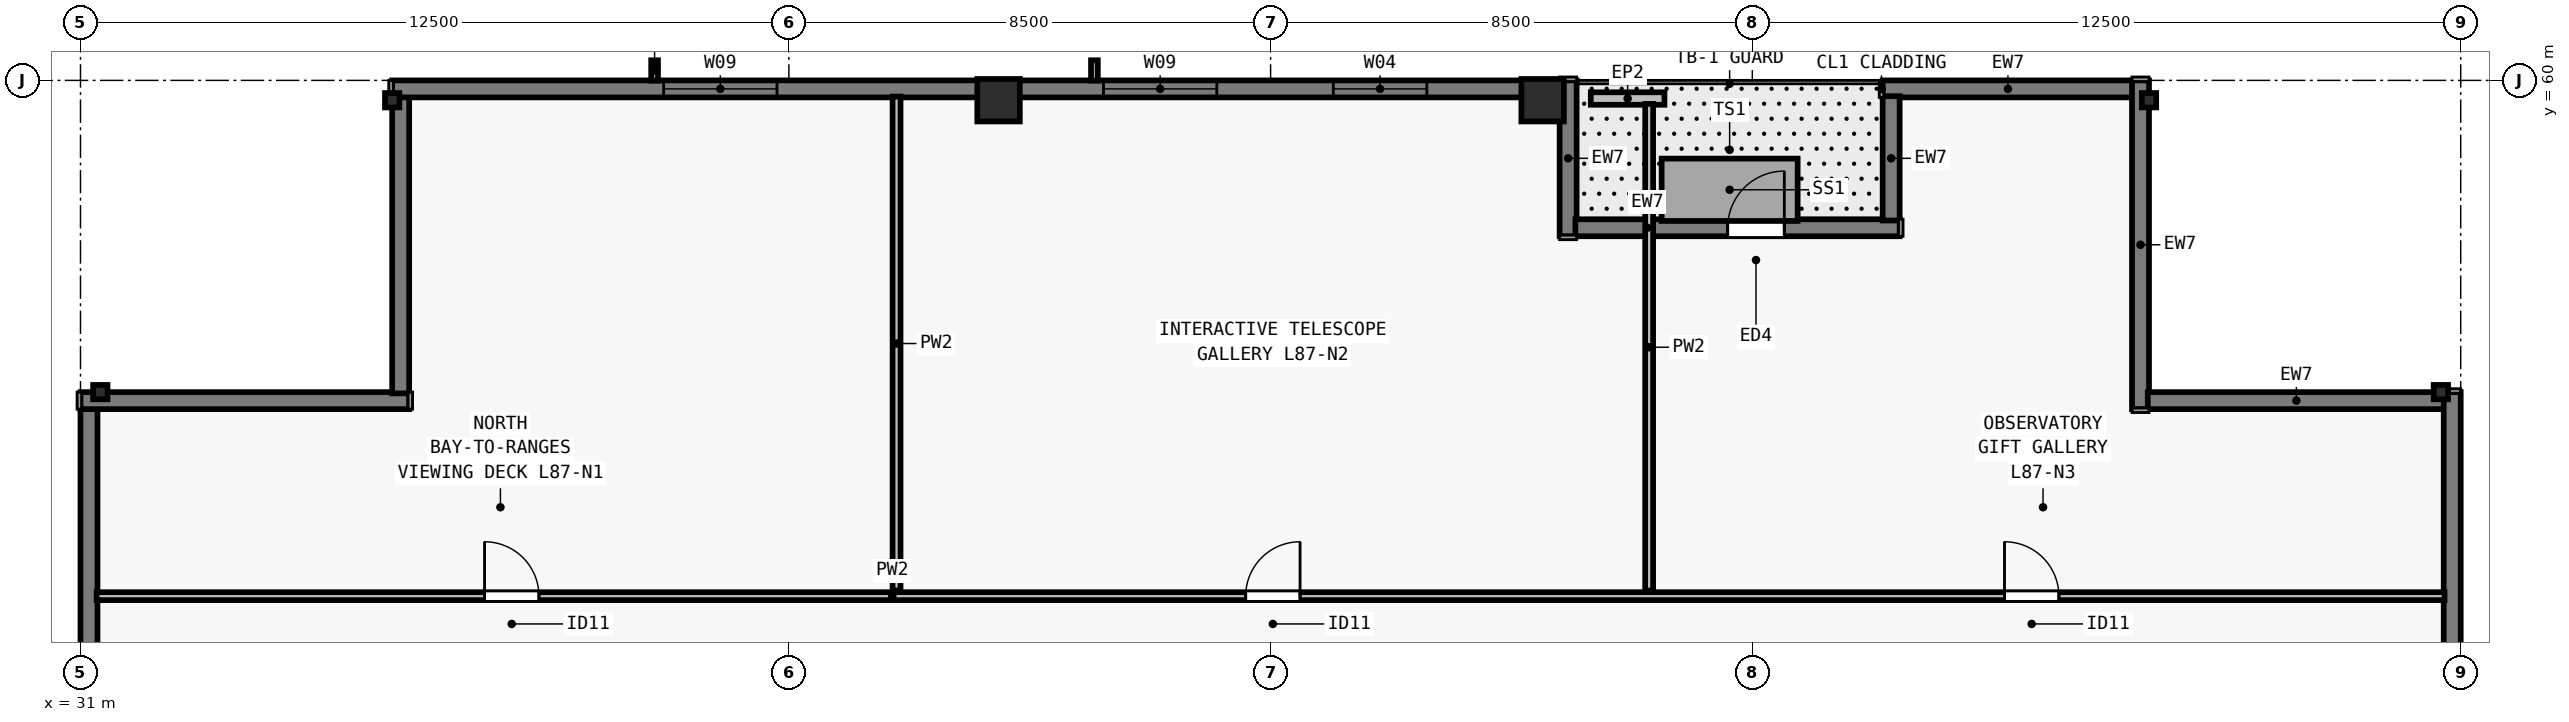
"""IFC4 building model, lengths in metres.
Left out: names, types, materials, properties, quantities, classifications, styles, units other than length and angle.
Written with IfcOpenShell. Run it as: python <this file> out.ifc"""

import sys

from ifc_helpers import new_model, si_unit, direction, frame, frame_2d, origin, origin_2d, place, context, subcontext, project, spatial, rectangle, i_section, extrude, element, fill, save


model = new_model("IFC4")
c1 = context("Model", 3, precision=1e-05, world=origin(), true_north=direction((0.0, 1.0)))
c2 = subcontext(c1, "Body", "Model", "MODEL_VIEW")
j1 = project(units=[si_unit("LENGTHUNIT", "METRE"), si_unit("PLANEANGLEUNIT", "RADIAN")], contexts=[c1])
p1 = place(None, origin())
s1 = spatial("IfcSite", under=j1, at=p1, CompositionType="ELEMENT")
p2 = place(p1, origin())
s2 = spatial("IfcBuilding", under=s1, at=p2, CompositionType="ELEMENT")
p3 = place(p2, frame((0.0, 0.0, 315.5)))
s3 = spatial("IfcBuildingStorey", under=s2, at=p3, CompositionType="ELEMENT", Elevation=315.5)
for number, where, z_axis, x_axis in (
    (1, (72.65, 54.5, 0.0), (0.0, 0.0, 1.0), (0.0, 1.0, 0.0)),
    (2, (67.5, 59.65, 0.0), (0.0, 0.0, 1.0), (1.0, 0.0, 0.0)),
):
    element("IfcColumn", number, at=place(p3, frame(where, z_axis=z_axis, x_axis=x_axis)), inside=s3, PredefinedType="COLUMN", context=c2, shape_type="SweptSolid", body=[
        extrude(i_section(OverallWidth=0.254, OverallDepth=0.254, WebThickness=0.009, FlangeThickness=0.014, FilletRadius=0.013, at=origin_2d()), origin(), (0.0, 0.0, 1.0), 4.5),
    ])
for number, where, z_axis, x_axis in (
    (3, (56.8, 59.65, 0.0), (0.0, 0.0, 1.0), (1.0, 0.0, 0.0)),
    (4, (47.2, 59.65, 0.0), (0.0, 0.0, 1.0), (1.0, 0.0, 0.0)),
):
    element("IfcColumn", number, at=place(p3, frame(where, z_axis=z_axis, x_axis=x_axis)), inside=s3, PredefinedType="COLUMN", context=c2, shape_type="SweptSolid", body=[
        extrude(rectangle(XDim=0.75, YDim=0.75, at=origin_2d()), origin(), (0.0, 0.0, 1.0), 4.5),
    ])
for number, where, z_axis, x_axis in (
    (5, (36.5, 59.65, 0.0), (0.0, 0.0, 1.0), (1.0, 0.0, 0.0)),
    (6, (31.35, 54.5, 0.0), (0.0, 0.0, 1.0), (0.0, 1.0, 0.0)),
):
    element("IfcColumn", number, at=place(p3, frame(where, z_axis=z_axis, x_axis=x_axis)), inside=s3, PredefinedType="COLUMN", context=c2, shape_type="SweptSolid", body=[
        extrude(i_section(OverallWidth=0.254, OverallDepth=0.254, WebThickness=0.009, FlangeThickness=0.014, FilletRadius=0.013, at=origin_2d()), origin(), (0.0, 0.0, 1.0), 4.5),
    ])
p4 = place(p3, frame((62.8, 59.85, 0.0), z_axis=(0.0, 0.0, 1.0), x_axis=(1.0, 0.0, 0.0)))
e7 = element("IfcWall", 7, at=p4, inside=s3, PredefinedType="SOLIDWALL", context=c2, shape_type="SweptSolid", body=[
    extrude(rectangle(XDim=4.422, YDim=0.3, at=frame_2d((2.211, 0.0))), origin(), (0.0, 0.0, 1.0), 4.29),
])
p5 = place(p3, frame((67.35, 60.0, 0.0), z_axis=(0.0, 0.0, 1.0), x_axis=(0.0, -1.0, 0.0)))
e8 = element("IfcWall", 8, at=p5, inside=s3, PredefinedType="SOLIDWALL", context=c2, shape_type="SweptSolid", body=[
    extrude(rectangle(XDim=5.8, YDim=0.3, at=frame_2d((2.9, 0.0))), origin(), (0.0, 0.0, 1.0), 4.29),
])
p6 = place(p3, frame((67.478, 54.35, 0.0), z_axis=(0.0, 0.0, 1.0), x_axis=(1.0, 0.0, 0.0)))
e9 = element("IfcWall", 9, at=p6, inside=s3, PredefinedType="SOLIDWALL", context=c2, shape_type="SweptSolid", body=[
    extrude(rectangle(XDim=5.244, YDim=0.3, at=frame_2d((2.622, 0.0))), origin(), (0.0, 0.0, 1.0), 4.29),
])
p7 = place(p3, frame((72.85, 54.5, 0.0), z_axis=(0.0, 0.0, 1.0), x_axis=(0.0, -1.0, 0.0)))
e10 = element("IfcWall", 10, at=p7, inside=s3, PredefinedType="SOLIDWALL", context=c2, shape_type="SweptSolid", body=[
    extrude(rectangle(XDim=11.8, YDim=0.3, at=frame_2d((5.9, 0.0))), origin(), (0.0, 0.0, 1.0), 4.29),
])
p8 = place(p3, frame((31.15, 42.7, 0.0), z_axis=(0.0, 0.0, 1.0), x_axis=(0.0, 1.0, 0.0)))
e11 = element("IfcWall", 11, at=p8, inside=s3, PredefinedType="SOLIDWALL", context=c2, shape_type="SweptSolid", body=[
    extrude(rectangle(XDim=11.522, YDim=0.3, at=frame_2d((5.761, 0.0))), origin(), (0.0, 0.0, 1.0), 4.29),
])
p9 = place(p3, frame((31.0, 54.35, 0.0), z_axis=(0.0, 0.0, 1.0), x_axis=(1.0, 0.0, 0.0)))
e12 = element("IfcWall", 12, at=p9, inside=s3, PredefinedType="SOLIDWALL", context=c2, shape_type="SweptSolid", body=[
    extrude(rectangle(XDim=5.8, YDim=0.3, at=frame_2d((2.9, 0.0))), origin(), (0.0, 0.0, 1.0), 4.29),
])
p10 = place(p3, frame((36.65, 54.478, 0.0), z_axis=(0.0, 0.0, 1.0), x_axis=(0.0, 1.0, 0.0)))
e13 = element("IfcWall", 13, at=p10, inside=s3, PredefinedType="SOLIDWALL", context=c2, shape_type="SweptSolid", body=[
    extrude(rectangle(XDim=5.244, YDim=0.3, at=frame_2d((2.622, 0.0))), origin(), (0.0, 0.0, 1.0), 4.29),
])
p11 = place(p3, frame((36.5, 59.85, 0.0), z_axis=(0.0, 0.0, 1.0), x_axis=(1.0, 0.0, 0.0)))
e14 = element("IfcWall", 14, at=p11, inside=s3, PredefinedType="SOLIDWALL", context=c2, shape_type="SweptSolid", body=[
    extrude(rectangle(XDim=20.622, YDim=0.3, at=frame_2d((10.311, 0.0))), origin(), (0.0, 0.0, 1.0), 4.29),
])
p12 = place(p11, frame((4.79, 0.0, 0.8)))
e15 = element("IfcOpeningElement", 15, at=p12, cuts=e14, PredefinedType="OPENING", context=c2, shape_type="SweptSolid", body=[
    extrude(rectangle(XDim=2.0, YDim=1.85, at=frame_2d((1.0, 0.925))), frame((0.0, 0.16, 0.0), z_axis=(0.0, -1.0, 0.0), x_axis=(1.0, 0.0, 0.0)), (0.0, 0.0, 1.0), 0.32),
])
p13 = place(p11, frame((12.551, 0.0, 0.8)))
e16 = element("IfcOpeningElement", 16, at=p13, cuts=e14, PredefinedType="OPENING", context=c2, shape_type="SweptSolid", body=[
    extrude(rectangle(XDim=2.0, YDim=1.85, at=frame_2d((1.0, 0.925))), frame((0.0, 0.16, 0.0), z_axis=(0.0, -1.0, 0.0), x_axis=(1.0, 0.0, 0.0)), (0.0, 0.0, 1.0), 0.32),
])
p14 = place(p11, frame((16.607, 0.0, 0.8)))
e17 = element("IfcOpeningElement", 17, at=p14, cuts=e14, PredefinedType="OPENING", context=c2, shape_type="SweptSolid", body=[
    extrude(rectangle(XDim=1.65, YDim=1.85, at=frame_2d((0.825, 0.925))), frame((0.0, 0.16, 0.0), z_axis=(0.0, -1.0, 0.0), x_axis=(1.0, 0.0, 0.0)), (0.0, 0.0, 1.0), 0.32),
])
p15 = place(p3, frame((57.25, 60.0, 0.0), z_axis=(0.0, 0.0, 1.0), x_axis=(0.0, -1.0, 0.0)))
e18 = element("IfcWall", 18, at=p15, inside=s3, PredefinedType="SOLIDWALL", context=c2, shape_type="SweptSolid", body=[
    extrude(rectangle(XDim=2.75, YDim=0.3, at=frame_2d((1.375, 0.0))), origin(), (0.0, 0.0, 1.0), 4.29),
])
p16 = place(p3, frame((57.378, 57.4, 0.0), z_axis=(0.0, 0.0, 1.0), x_axis=(1.0, 0.0, 0.0)))
e19 = element("IfcWall", 19, at=p16, inside=s3, PredefinedType="SOLIDWALL", context=c2, shape_type="SweptSolid", body=[
    extrude(rectangle(XDim=5.722, YDim=0.3, at=frame_2d((2.861, 0.0))), origin(), (0.0, 0.0, 1.0), 4.29),
])
p17 = place(p16, frame((2.687, 0.0, 0.0)))
e20 = element("IfcOpeningElement", 20, at=p17, cuts=e19, PredefinedType="OPENING", context=c2, shape_type="SweptSolid", body=[
    extrude(rectangle(XDim=1.0, YDim=2.15, at=frame_2d((0.5, 1.075))), frame((0.0, 0.16, 0.0), z_axis=(0.0, -1.0, 0.0), x_axis=(1.0, 0.0, 0.0)), (0.0, 0.0, 1.0), 0.32),
])
p18 = place(p3, frame((62.95, 57.528, 0.0), z_axis=(0.0, 0.0, 1.0), x_axis=(0.0, 1.0, 0.0)))
e21 = element("IfcWall", 21, at=p18, inside=s3, PredefinedType="SOLIDWALL", context=c2, shape_type="SweptSolid", body=[
    extrude(rectangle(XDim=2.194, YDim=0.3, at=frame_2d((1.097, 0.0))), origin(), (0.0, 0.0, 1.0), 4.29),
])
p19 = place(p3, frame((57.65, 59.68, 0.0), z_axis=(0.0, 0.0, 1.0), x_axis=(1.0, 0.0, 0.0)))
e22 = element("IfcWall", 22, at=p19, inside=s3, PredefinedType="PARAPET", context=c2, shape_type="SweptSolid", body=[
    extrude(rectangle(XDim=1.3, YDim=0.22, at=frame_2d((0.65, 0.0))), origin(), (0.0, 0.0, 1.0), 0.55),
])
p20 = place(p3, frame((31.285, 50.9, 0.0), z_axis=(0.0, 0.0, 1.0), x_axis=(1.0, 0.0, 0.0)))
e23 = element("IfcWall", 23, at=p20, inside=s3, PredefinedType="PARTITIONING", context=c2, shape_type="SweptSolid", body=[
    extrude(rectangle(XDim=41.43, YDim=0.14, at=frame_2d((20.715, 0.0))), origin(), (0.0, 0.0, 1.0), 4.009),
])
p21 = place(p20, frame((6.845, 0.0, 0.0)))
e24 = element("IfcOpeningElement", 24, at=p21, cuts=e23, PredefinedType="OPENING", context=c2, shape_type="SweptSolid", body=[
    extrude(rectangle(XDim=0.96, YDim=2.12, at=frame_2d((0.48, 1.06))), frame((0.0, 0.08, 0.0), z_axis=(0.0, -1.0, 0.0), x_axis=(1.0, 0.0, 0.0)), (0.0, 0.0, 1.0), 0.16),
])
p22 = place(p20, frame((20.275, 0.0, 0.0)))
e25 = element("IfcOpeningElement", 25, at=p22, cuts=e23, PredefinedType="OPENING", context=c2, shape_type="SweptSolid", body=[
    extrude(rectangle(XDim=0.96, YDim=2.12, at=frame_2d((0.48, 1.06))), frame((0.0, 0.08, 0.0), z_axis=(0.0, -1.0, 0.0), x_axis=(1.0, 0.0, 0.0)), (0.0, 0.0, 1.0), 0.16),
])
p23 = place(p20, frame((33.665, 0.0, 0.0)))
e26 = element("IfcOpeningElement", 26, at=p23, cuts=e23, PredefinedType="OPENING", context=c2, shape_type="SweptSolid", body=[
    extrude(rectangle(XDim=0.96, YDim=2.12, at=frame_2d((0.48, 1.06))), frame((0.0, 0.08, 0.0), z_axis=(0.0, -1.0, 0.0), x_axis=(1.0, 0.0, 0.0)), (0.0, 0.0, 1.0), 0.16),
])
p24 = place(p3, frame((45.4, 51.0, 0.0), z_axis=(0.0, 0.0, 1.0), x_axis=(0.0, 1.0, 0.0)))
e27 = element("IfcWall", 27, at=p24, inside=s3, PredefinedType="PARTITIONING", context=c2, shape_type="SweptSolid", body=[
    extrude(rectangle(XDim=8.715, YDim=0.14, at=frame_2d((4.357, 0.0))), origin(), (0.0, 0.0, 1.0), 4.29),
])
p25 = place(p3, frame((58.68, 51.0, 0.0), z_axis=(0.0, 0.0, 1.0), x_axis=(0.0, 1.0, 0.0)))
e28 = element("IfcWall", 28, at=p25, inside=s3, PredefinedType="PARTITIONING", context=c2, shape_type="SweptSolid", body=[
    extrude(rectangle(XDim=8.585, YDim=0.14, at=frame_2d((4.292, 0.0))), origin(), (0.0, 0.0, 1.0), 4.29),
])
p26 = place(p12, origin())
e29 = element("IfcWindow", 29, at=p26, inside=s3, PartitioningType="SINGLE_PANEL", PredefinedType="WINDOW", context=c2, shape_type="SweptSolid", body=[
    extrude(rectangle(XDim=2.0, YDim=1.85, at=frame_2d((1.0, 0.925))), frame((0.0, -0.05, 0.0), z_axis=(0.0, -1.0, 0.0), x_axis=(1.0, 0.0, 0.0)), (0.0, 0.0, 1.0), 0.06),
])
fill(e15, e29)
p27 = place(p13, origin())
e30 = element("IfcWindow", 30, at=p27, inside=s3, PartitioningType="SINGLE_PANEL", PredefinedType="WINDOW", context=c2, shape_type="SweptSolid", body=[
    extrude(rectangle(XDim=2.0, YDim=1.85, at=frame_2d((1.0, 0.925))), frame((0.0, -0.05, 0.0), z_axis=(0.0, -1.0, 0.0), x_axis=(1.0, 0.0, 0.0)), (0.0, 0.0, 1.0), 0.06),
])
fill(e16, e30)
p28 = place(p14, origin())
e31 = element("IfcWindow", 31, at=p28, inside=s3, PartitioningType="SINGLE_PANEL", PredefinedType="WINDOW", context=c2, shape_type="SweptSolid", body=[
    extrude(rectangle(XDim=1.65, YDim=1.85, at=frame_2d((0.825, 0.925))), frame((0.0, -0.05, 0.0), z_axis=(0.0, -1.0, 0.0), x_axis=(1.0, 0.0, 0.0)), (0.0, 0.0, 1.0), 0.06),
])
fill(e17, e31)
p29 = place(p17, origin())
e32 = element("IfcDoor", 32, at=p29, inside=s3, OperationType="SINGLE_SWING_RIGHT", PredefinedType="DOOR", context=c2, shape_type="SweptSolid", body=[
    extrude(rectangle(XDim=1.0, YDim=2.15, at=frame_2d((0.5, 1.075))), frame((0.0, 0.025, 0.0), z_axis=(0.0, -1.0, 0.0), x_axis=(1.0, 0.0, 0.0)), (0.0, 0.0, 1.0), 0.05),
])
fill(e20, e32)
p30 = place(p21, origin())
e33 = element("IfcDoor", 33, at=p30, inside=s3, OperationType="SINGLE_SWING_LEFT", PredefinedType="DOOR", context=c2, shape_type="SweptSolid", body=[
    extrude(rectangle(XDim=0.96, YDim=2.12, at=frame_2d((0.48, 1.06))), frame((0.0, 0.025, 0.0), z_axis=(0.0, -1.0, 0.0), x_axis=(1.0, 0.0, 0.0)), (0.0, 0.0, 1.0), 0.05),
])
fill(e24, e33)
p31 = place(p22, origin())
e34 = element("IfcDoor", 34, at=p31, inside=s3, OperationType="SINGLE_SWING_RIGHT", PredefinedType="DOOR", context=c2, shape_type="SweptSolid", body=[
    extrude(rectangle(XDim=0.96, YDim=2.12, at=frame_2d((0.48, 1.06))), frame((0.0, 0.025, 0.0), z_axis=(0.0, -1.0, 0.0), x_axis=(1.0, 0.0, 0.0)), (0.0, 0.0, 1.0), 0.05),
])
fill(e25, e34)
p32 = place(p23, origin())
e35 = element("IfcDoor", 35, at=p32, inside=s3, OperationType="SINGLE_SWING_LEFT", PredefinedType="DOOR", context=c2, shape_type="SweptSolid", body=[
    extrude(rectangle(XDim=0.96, YDim=2.12, at=frame_2d((0.48, 1.06))), frame((0.0, 0.025, 0.0), z_axis=(0.0, -1.0, 0.0), x_axis=(1.0, 0.0, 0.0)), (0.0, 0.0, 1.0), 0.05),
])
fill(e26, e35)
save(model, sys.argv[1])
